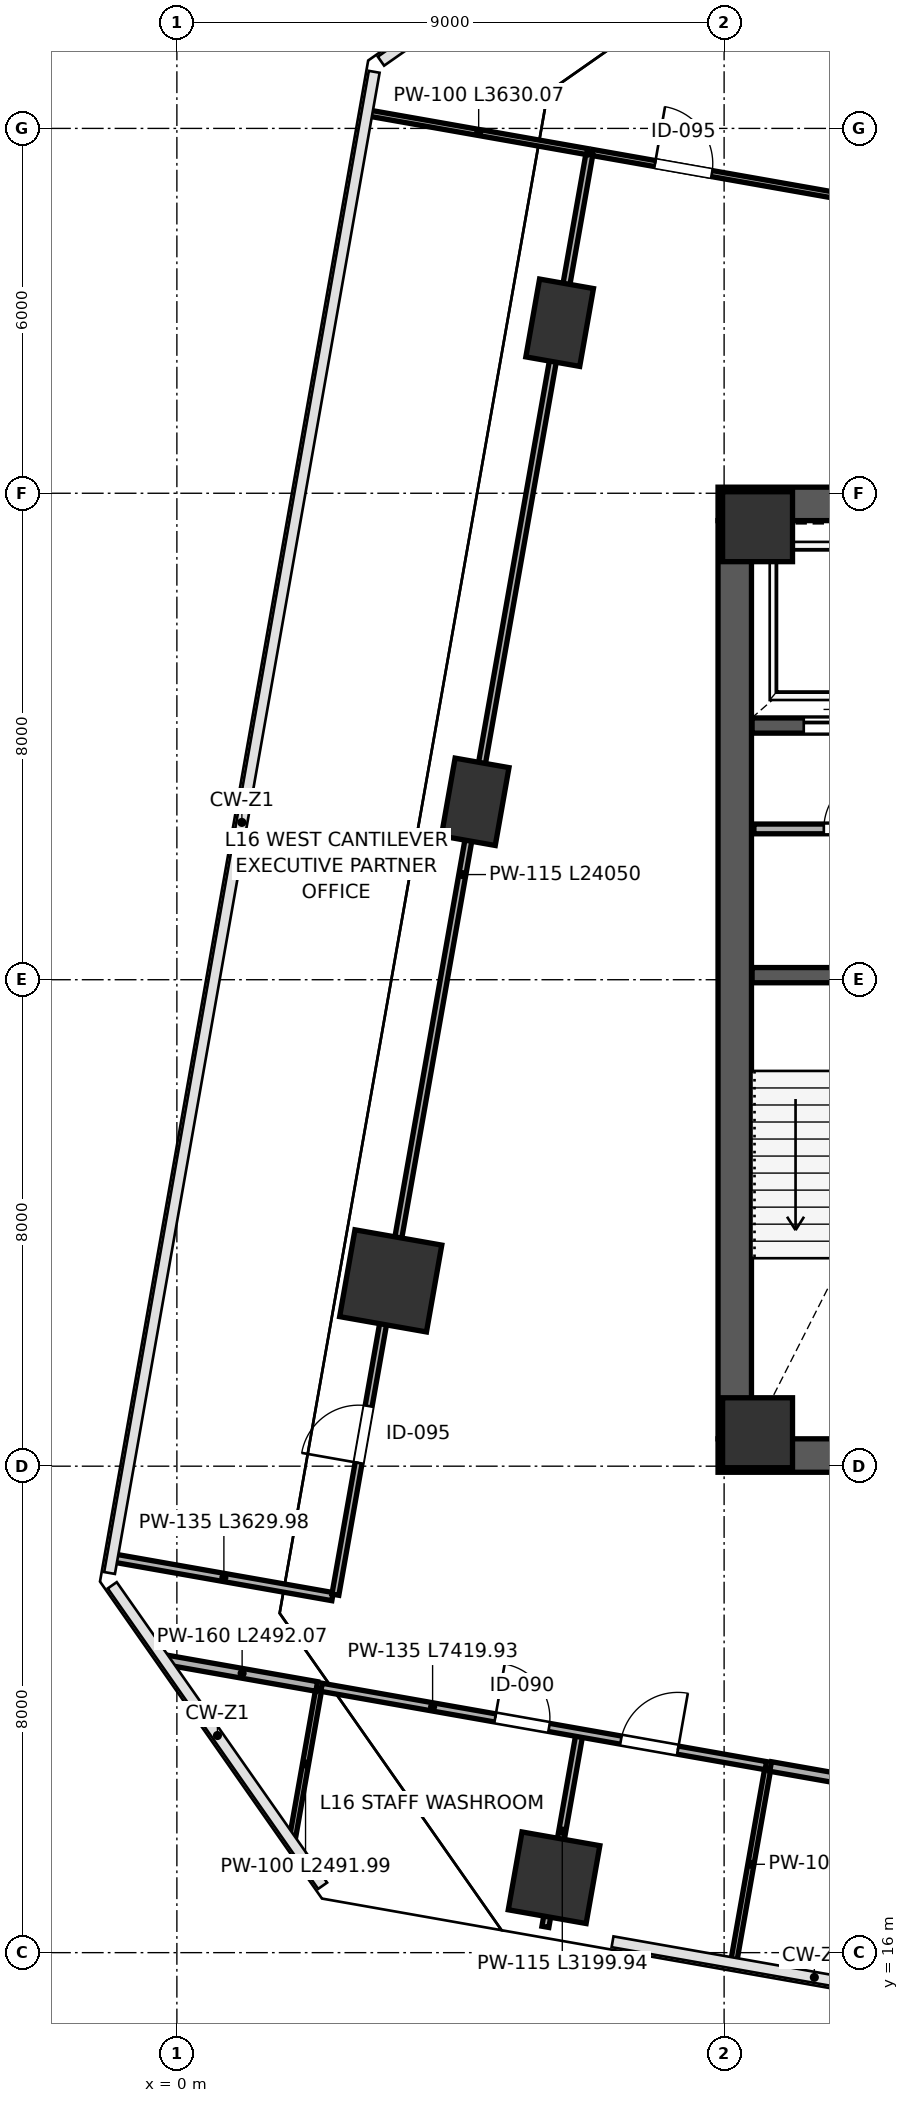
"""IFC4 building model, lengths in metres.
Left out: names, types, materials, properties, quantities, classifications, styles, units other than length and angle.
Written with IfcOpenShell. Run it as: python <this file> out.ifc"""

import sys

from ifc_helpers import new_model, si_unit, direction, frame, frame_2d, origin, origin_2d, place, context, subcontext, project, spatial, rectangle, extrude, source, transform, mapped, element, fill, save


model = new_model("IFC4")
c1 = context("Model", 3, precision=1e-05, world=origin(), true_north=direction((0.0, 1.0)))
c2 = subcontext(c1, "Body", "Model", "MODEL_VIEW")
j1 = project(units=[si_unit("LENGTHUNIT", "METRE"), si_unit("PLANEANGLEUNIT", "RADIAN")], contexts=[c1])
p1 = place(None, origin())
s1 = spatial("IfcSite", under=j1, at=p1, CompositionType="ELEMENT")
p2 = place(p1, origin())
s2 = spatial("IfcBuilding", under=s1, at=p2, CompositionType="ELEMENT")
p3 = place(p2, frame((0.0, 0.0, 74.8)))
s3 = spatial("IfcBuildingStorey", under=s2, at=p3, CompositionType="ELEMENT", Elevation=74.8)
m1 = source(origin(), c2, "Body", "SweptSolid", [
    extrude(rectangle(XDim=1.15, YDim=1.15, at=origin_2d()), origin(), (0.0, 0.0, 1.0), 4.198),
])
for number, where, z_axis, x_axis in (
    (1, (9.55, 24.55, 0.001), (0.0, 0.0, 1.0), (1.0, 0.0, 0.0)),
    (2, (9.55, 39.45, 0.001), (0.0, 0.0, 1.0), (1.0, 0.0, 0.0)),
):
    element("IfcColumn", number, at=place(p3, frame(where, z_axis=z_axis, x_axis=x_axis)), inside=s3, PredefinedType="COLUMN", context=c2, shape_type="MappedRepresentation", body=[
        mapped(m1, transform((0.0, 0.0, 0.0), scale=1.0)),
    ])
m2 = source(origin(), c2, "Body", "SweptSolid", [
    extrude(rectangle(XDim=1.3, YDim=1.3, at=origin_2d()), origin(), (0.0, 0.0, 1.0), 4.198),
])
p4 = place(p3, frame((6.203, 17.232, 0.001), z_axis=(0.0, 0.0, 1.0), x_axis=(-0.984807753012, 0.173648177667, 0.0)))
e3 = element("IfcColumn", 3, at=p4, inside=s3, PredefinedType="COLUMN", context=c2, shape_type="MappedRepresentation", body=[
    mapped(m2, transform((0.0, 0.0, 0.0), scale=1.0)),
])
m3 = source(origin(), c2, "Body", "SweptSolid", [
    extrude(rectangle(XDim=1.45, YDim=1.45, at=origin_2d()), origin(), (0.0, 0.0, 1.0), 4.198),
])
p5 = place(p3, frame((3.517, 27.048, 0.001), z_axis=(0.0, 0.0, 1.0), x_axis=(-0.984807753012, 0.173648177667, 0.0)))
e4 = element("IfcColumn", 4, at=p5, inside=s3, PredefinedType="COLUMN", context=c2, shape_type="MappedRepresentation", body=[
    mapped(m3, transform((0.0, 0.0, 0.0), scale=1.0)),
])
m4 = source(origin(), c2, "Body", "SweptSolid", [
    extrude(rectangle(XDim=0.9, YDim=1.3, at=origin_2d()), origin(), (0.0, 0.0, 1.0), 4.198),
])
for number, where, z_axis, x_axis in (
    (5, (4.906, 34.926, 0.001), (0.0, 0.0, 1.0), (-0.985, 0.174, 0.0)),
    (6, (6.295, 42.804, 0.001), (0.0, 0.0, 1.0), (-0.985, 0.174, 0.0)),
):
    element("IfcColumn", number, at=place(p3, frame(where, z_axis=z_axis, x_axis=x_axis)), inside=s3, PredefinedType="PILASTER", context=c2, shape_type="MappedRepresentation", body=[
        mapped(m4, transform((0.0, 0.0, 0.0), scale=1.0)),
    ])
p6 = place(p3, frame((9.175, 24.45, 0.0), z_axis=(0.0, 0.0, 1.0), x_axis=(0.0, 1.0, 0.0)))
e7 = element("IfcWall", 7, at=p6, inside=s3, PredefinedType="SHEAR", context=c2, shape_type="SweptSolid", body=[
    extrude(rectangle(XDim=15.1, YDim=0.55, at=frame_2d((7.55, 0.0))), origin(), (0.0, 0.0, 1.0), 3.96),
])
for number, where, z_axis, x_axis in (
    (8, (8.9, 24.175, 0.0), (0.0, 0.0, 1.0), (1.0, 0.0, 0.0)),
    (9, (8.9, 39.825, 0.0), (0.0, 0.0, 1.0), (1.0, 0.0, 0.0)),
):
    element("IfcWall", number, at=place(p3, frame(where, z_axis=z_axis, x_axis=x_axis)), inside=s3, PredefinedType="SHEAR", context=c2, shape_type="SweptSolid", body=[
        extrude(rectangle(XDim=18.2, YDim=0.55, at=frame_2d((9.1, 0.0))), origin(), (0.0, 0.0, 1.0), 3.96),
    ])
p7 = place(p3, frame((9.46, 32.075, 0.0), z_axis=(0.0, 0.0, 1.0), x_axis=(1.0, 0.0, 0.0)))
e10 = element("IfcWall", 10, at=p7, inside=s3, PredefinedType="SHEAR", context=c2, shape_type="SweptSolid", body=[
    extrude(rectangle(XDim=3.29, YDim=0.25, at=frame_2d((1.645, 0.0))), origin(), (0.0, 0.0, 1.0), 3.96),
])
p8 = place(p3, frame((9.46, 36.18, 0.0), z_axis=(0.0, 0.0, 1.0), x_axis=(1.0, 0.0, 0.0)))
e11 = element("IfcWall", 11, at=p8, inside=s3, PredefinedType="SHEAR", context=c2, shape_type="SweptSolid", body=[
    extrude(rectangle(XDim=3.79, YDim=0.25, at=frame_2d((1.895, 0.0))), origin(), (0.0, 0.0, 1.0), 3.96),
])
p9 = place(p8, frame((2.62, 0.0, 0.0)))
e12 = element("IfcOpeningElement", 12, at=p9, cuts=e11, PredefinedType="OPENING", context=c2, shape_type="SweptSolid", body=[
    extrude(rectangle(XDim=0.85, YDim=2.1, at=frame_2d((0.425, 1.05))), frame((0.0, 0.135, 0.0), z_axis=(0.0, -1.0, 0.0), x_axis=(1.0, 0.0, 0.0)), (0.0, 0.0, 1.0), 0.27),
])
p10 = place(p8, frame((0.85, 0.0, 0.0)))
e13 = element("IfcOpeningElement", 13, at=p10, cuts=e11, PredefinedType="OPENING", context=c2, shape_type="SweptSolid", body=[
    extrude(rectangle(XDim=1.3, YDim=2.25, at=frame_2d((0.65, 1.125))), frame((0.0, 0.135, 0.0), z_axis=(0.0, -1.0, 0.0), x_axis=(1.0, 0.0, 0.0)), (0.0, 0.0, 1.0), 0.27),
])
p11 = place(p3, frame((9.49, 34.48, 0.0), z_axis=(0.0, 0.0, 1.0), x_axis=(1.0, 0.0, 0.0)))
e14 = element("IfcWall", 14, at=p11, inside=s3, PredefinedType="PARTITIONING", context=c2, shape_type="SweptSolid", body=[
    extrude(rectangle(XDim=3.7, YDim=0.16, at=frame_2d((1.85, 0.0))), origin(), (0.0, 0.0, 1.0), 3.96),
])
p12 = place(p11, frame((1.15, 0.0, 0.0)))
e15 = element("IfcOpeningElement", 15, at=p12, cuts=e14, PredefinedType="OPENING", context=c2, shape_type="SweptSolid", body=[
    extrude(rectangle(XDim=0.9, YDim=2.15, at=frame_2d((0.45, 1.075))), frame((0.0, 0.09, 0.0), z_axis=(0.0, -1.0, 0.0), x_axis=(1.0, 0.0, 0.0)), (0.0, 0.0, 1.0), 0.18),
])
p13 = place(p3, frame((1.9, 17.877, 0.0), z_axis=(0.0, 0.0, 1.0), x_axis=(0.173701499557, 0.984798349436, 0.0)))
e16 = element("IfcWall", 16, at=p13, inside=s3, PredefinedType="PARTITIONING", context=c2, shape_type="SweptSolid", body=[
    extrude(rectangle(XDim=2.492, YDim=0.1, at=frame_2d((1.246, 0.0))), origin(), (0.0, 0.0, 1.0), 3.96),
])
p14 = place(p3, frame((-0.154, 20.81, 0.0), z_axis=(0.0, 0.0, 1.0), x_axis=(0.984798349436, -0.173701499557, 0.0)))
e17 = element("IfcWall", 17, at=p14, inside=s3, PredefinedType="PARTITIONING", context=c2, shape_type="SweptSolid", body=[
    extrude(rectangle(XDim=2.492, YDim=0.16, at=frame_2d((1.246, 0.0))), origin(), (0.0, 0.0, 1.0), 3.96),
])
p15 = place(p3, frame((6.061, 16.424, 0.0), z_axis=(0.0, 0.0, 1.0), x_axis=(0.173646056486, 0.984808127031, 0.0)))
e18 = element("IfcWall", 18, at=p15, inside=s3, PredefinedType="PARTITIONING", context=c2, shape_type="SweptSolid", body=[
    extrude(rectangle(XDim=3.2, YDim=0.115, at=frame_2d((1.6, 0.0))), origin(), (0.0, 0.0, 1.0), 3.095),
])
p16 = place(p3, frame((9.163, 15.877, 0.0), z_axis=(0.0, 0.0, 1.0), x_axis=(0.173646056486, 0.984808127031, 0.0)))
e19 = element("IfcWall", 19, at=p16, inside=s3, PredefinedType="PARTITIONING", context=c2, shape_type="SweptSolid", body=[
    extrude(rectangle(XDim=3.2, YDim=0.1, at=frame_2d((1.6, 0.0))), origin(), (0.0, 0.0, 1.0), 3.095),
])
p17 = place(p3, frame((2.379, 20.364, 0.0), z_axis=(0.0, 0.0, 1.0), x_axis=(0.984810378022, -0.173633289837, 0.0)))
e20 = element("IfcWall", 20, at=p17, inside=s3, PredefinedType="PARTITIONING", context=c2, shape_type="SweptSolid", body=[
    extrude(rectangle(XDim=7.42, YDim=0.135, at=frame_2d((3.71, 0.0))), origin(), (0.0, 0.0, 1.0), 3.96),
])
p18 = place(p17, frame((2.9, 0.0, 0.0)))
e21 = element("IfcOpeningElement", 21, at=p18, cuts=e20, PredefinedType="OPENING", context=c2, shape_type="SweptSolid", body=[
    extrude(rectangle(XDim=0.9, YDim=2.15, at=frame_2d((0.45, 1.075))), frame((0.0, 0.078, 0.0), z_axis=(0.0, -1.0, 0.0), x_axis=(1.0, 0.0, 0.0)), (0.0, 0.0, 1.0), 0.155),
])
p19 = place(p17, frame((5.0, 0.0, 0.0)))
e22 = element("IfcOpeningElement", 22, at=p19, cuts=e20, PredefinedType="OPENING", context=c2, shape_type="SweptSolid", body=[
    extrude(rectangle(XDim=0.95, YDim=2.15, at=frame_2d((0.475, 1.075))), frame((0.0, 0.078, 0.0), z_axis=(0.0, -1.0, 0.0), x_axis=(1.0, 0.0, 0.0)), (0.0, 0.0, 1.0), 0.155),
])
p20 = place(p3, frame((9.765, 19.061, 0.0), z_axis=(0.0, 0.0, 1.0), x_axis=(0.984807312871, -0.173650673815, 0.0)))
e23 = element("IfcWall", 23, at=p20, inside=s3, PredefinedType="PARTITIONING", context=c2, shape_type="SweptSolid", body=[
    extrude(rectangle(XDim=18.1, YDim=0.16, at=frame_2d((9.05, 0.0))), origin(), (0.0, 0.0, 1.0), 3.96),
])
p21 = place(p20, frame((1.45, 0.0, 0.0)))
e24 = element("IfcOpeningElement", 24, at=p21, cuts=e23, PredefinedType="OPENING", context=c2, shape_type="SweptSolid", body=[
    extrude(rectangle(XDim=0.95, YDim=2.15, at=frame_2d((0.475, 1.075))), frame((0.0, 0.09, 0.0), z_axis=(0.0, -1.0, 0.0), x_axis=(1.0, 0.0, 0.0)), (0.0, 0.0, 1.0), 0.18),
])
p22 = place(p3, frame((6.83, 45.604, 0.0), z_axis=(0.0, 0.0, 1.0), x_axis=(0.984806496121, -0.173655305701, 0.0)))
e25 = element("IfcWall", 25, at=p22, inside=s3, PredefinedType="PARTITIONING", context=c2, shape_type="SweptSolid", body=[
    extrude(rectangle(XDim=25.6, YDim=0.1, at=frame_2d((12.8, 0.0))), origin(), (0.0, 0.0, 1.0), 3.96),
])
p23 = place(p22, frame((1.05, 0.0, 0.0)))
e26 = element("IfcOpeningElement", 26, at=p23, cuts=e25, PredefinedType="OPENING", context=c2, shape_type="SweptSolid", body=[
    extrude(rectangle(XDim=0.95, YDim=2.15, at=frame_2d((0.475, 1.075))), frame((0.0, 0.06, 0.0), z_axis=(0.0, -1.0, 0.0), x_axis=(1.0, 0.0, 0.0)), (0.0, 0.0, 1.0), 0.12),
])
p24 = place(p3, frame((-1.014, 22.485, 0.0), z_axis=(0.0, 0.0, 1.0), x_axis=(0.984795743306, -0.173716274326, 0.0)))
e27 = element("IfcWall", 27, at=p24, inside=s3, PredefinedType="PARTITIONING", context=c2, shape_type="SweptSolid", body=[
    extrude(rectangle(XDim=3.63, YDim=0.135, at=frame_2d((1.815, 0.0))), origin(), (0.0, 0.0, 1.0), 3.96),
])
p25 = place(p3, frame((2.607, 21.887, 0.0), z_axis=(0.0, 0.0, 1.0), x_axis=(0.173659666579, 0.984805727138, 0.0)))
e28 = element("IfcWall", 28, at=p25, inside=s3, PredefinedType="PARTITIONING", context=c2, shape_type="SweptSolid", body=[
    extrude(rectangle(XDim=24.05, YDim=0.115, at=frame_2d((12.025, 0.0))), origin(), (0.0, 0.0, 1.0), 2.795),
])
p26 = place(p25, frame((2.2, 0.0, 0.0)))
e29 = element("IfcOpeningElement", 29, at=p26, cuts=e28, PredefinedType="OPENING", context=c2, shape_type="SweptSolid", body=[
    extrude(rectangle(XDim=0.95, YDim=2.15, at=frame_2d((0.475, 1.075))), frame((0.0, 0.067, 0.0), z_axis=(0.0, -1.0, 0.0), x_axis=(1.0, 0.0, 0.0)), (0.0, 0.0, 1.0), 0.135),
])
p27 = place(p3, frame((3.176, 46.249, 0.0), z_axis=(0.0, 0.0, 1.0), x_axis=(0.984795743306, -0.173716274326, 0.0)))
e30 = element("IfcWall", 30, at=p27, inside=s3, PredefinedType="PARTITIONING", context=c2, shape_type="SweptSolid", body=[
    extrude(rectangle(XDim=3.63, YDim=0.1, at=frame_2d((1.815, 0.0))), origin(), (0.0, 0.0, 1.0), 3.96),
])
m5 = source(origin(), c2, "Body", "SweptSolid", [
    extrude(rectangle(XDim=1.3, YDim=2.25, at=frame_2d((0.65, 1.125))), frame((0.0, 0.025, 0.0), z_axis=(0.0, -1.0, 0.0), x_axis=(1.0, 0.0, 0.0)), (0.0, 0.0, 1.0), 0.05),
])
p28 = place(p10, origin())
e31 = element("IfcDoor", 31, at=p28, inside=s3, OperationType="SLIDING_TO_LEFT", PredefinedType="DOOR", context=c2, shape_type="MappedRepresentation", body=[
    mapped(m5, transform((0.0, 0.0, 0.0), scale=1.0)),
])
fill(e13, e31)
m6 = source(origin(), c2, "Body", "SweptSolid", [
    extrude(rectangle(XDim=0.9, YDim=2.15, at=frame_2d((0.45, 1.075))), frame((0.0, 0.025, 0.0), z_axis=(0.0, -1.0, 0.0), x_axis=(1.0, 0.0, 0.0)), (0.0, 0.0, 1.0), 0.05),
])
p29 = place(p12, origin())
e32 = element("IfcDoor", 32, at=p29, inside=s3, OperationType="SINGLE_SWING_RIGHT", PredefinedType="DOOR", context=c2, shape_type="MappedRepresentation", body=[
    mapped(m6, transform((0.0, 0.0, 0.0), scale=1.0)),
])
fill(e15, e32)
m7 = source(origin(), c2, "Body", "SweptSolid", [
    extrude(rectangle(XDim=0.9, YDim=2.15, at=frame_2d((0.45, 1.075))), frame((0.0, 0.025, 0.0), z_axis=(0.0, -1.0, 0.0), x_axis=(1.0, 0.0, 0.0)), (0.0, 0.0, 1.0), 0.05),
])
p30 = place(p18, origin())
e33 = element("IfcDoor", 33, at=p30, inside=s3, OperationType="SINGLE_SWING_LEFT", PredefinedType="DOOR", context=c2, shape_type="MappedRepresentation", body=[
    mapped(m7, transform((0.0, 0.0, 0.0), scale=1.0)),
])
fill(e21, e33)
m8 = source(origin(), c2, "Body", "SweptSolid", [
    extrude(rectangle(XDim=0.95, YDim=2.15, at=frame_2d((0.475, 1.075))), frame((0.0, 0.025, 0.0), z_axis=(0.0, -1.0, 0.0), x_axis=(1.0, 0.0, 0.0)), (0.0, 0.0, 1.0), 0.05),
])
p31 = place(p19, origin())
e34 = element("IfcDoor", 34, at=p31, inside=s3, OperationType="SINGLE_SWING_RIGHT", PredefinedType="DOOR", context=c2, shape_type="MappedRepresentation", body=[
    mapped(m8, transform((0.0, 0.0, 0.0), scale=1.0)),
])
fill(e22, e34)
p32 = place(p23, origin())
e35 = element("IfcDoor", 35, at=p32, inside=s3, OperationType="SINGLE_SWING_LEFT", PredefinedType="DOOR", context=c2, shape_type="MappedRepresentation", body=[
    mapped(m8, transform((0.0, 0.0, 0.0), scale=1.0)),
])
fill(e26, e35)
p33 = place(p26, origin())
e36 = element("IfcDoor", 36, at=p33, inside=s3, OperationType="SINGLE_SWING_LEFT", PredefinedType="DOOR", context=c2, shape_type="MappedRepresentation", body=[
    mapped(m8, transform((0.0, 0.0, 0.0), scale=1.0)),
])
fill(e29, e36)
save(model, sys.argv[1])
